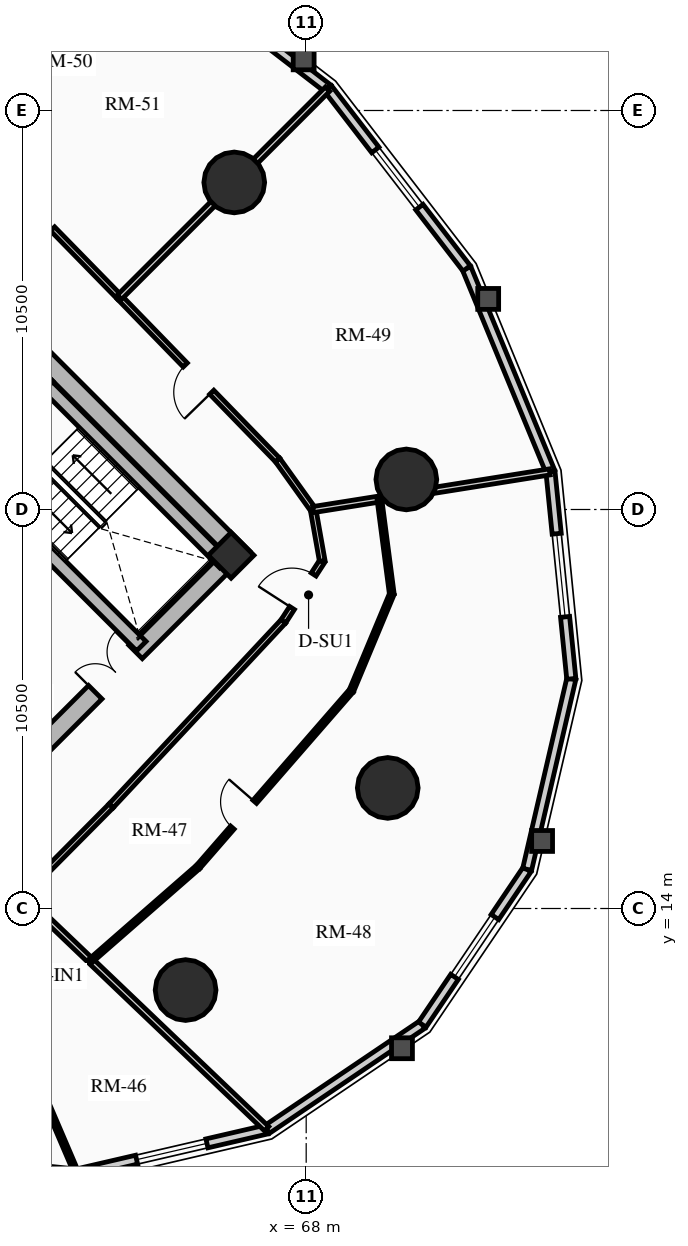
"""IFC4 building model, lengths in metres.
Left out: names, types, materials, properties, quantities, classifications, styles, units other than length and angle.
Written with IfcOpenShell. Run it as: python <this file> out.ifc"""

import sys

from ifc_helpers import new_model, si_unit, direction, frame, frame_2d, origin, origin_2d, place, context, subcontext, project, spatial, rectangle, circle, extrude, source, transform, mapped, element, fill, save


model = new_model("IFC4")
c1 = context("Model", 3, precision=1e-05, world=origin(), true_north=direction((0.0, 1.0)))
c2 = subcontext(c1, "Body", "Model", "MODEL_VIEW")
j1 = project(units=[si_unit("LENGTHUNIT", "METRE"), si_unit("PLANEANGLEUNIT", "RADIAN")], contexts=[c1])
p1 = place(None, origin())
s1 = spatial("IfcSite", under=j1, at=p1, CompositionType="ELEMENT")
p2 = place(p1, origin())
s2 = spatial("IfcBuilding", under=s1, at=p2, CompositionType="ELEMENT")
p3 = place(p2, frame((0.0, 0.0, 54.01)))
s3 = spatial("IfcBuildingStorey", under=s2, at=p3, CompositionType="ELEMENT", Elevation=54.01)
p4 = place(p3, frame((66.339, 23.227, 0.0), z_axis=(0.0, 0.0, 1.0), x_axis=(-0.707106781187, 0.707106781187, 0.0)))
e1 = element("IfcWall", 1, at=p4, inside=s3, PredefinedType="SHEAR", context=c2, shape_type="SweptSolid", body=[
    extrude(rectangle(XDim=14.3, YDim=0.5, at=frame_2d((7.15, 0.0))), origin(), (0.0, 0.0, 1.0), 2.91),
])
p5 = place(p3, frame((58.596, 15.838, 0.0), z_axis=(0.0, 0.0, 1.0), x_axis=(0.707106781187, 0.707106781187, 0.0)))
e2 = element("IfcWall", 2, at=p5, inside=s3, PredefinedType="SHEAR", context=c2, shape_type="SweptSolid", body=[
    extrude(rectangle(XDim=10.7, YDim=0.5, at=frame_2d((5.35, 0.0))), origin(), (0.0, 0.0, 1.0), 2.91),
])
m1 = source(origin(), c2, "Body", "SweptSolid", [
    extrude(rectangle(XDim=1.5, YDim=2.02, at=frame_2d((0.75, 1.01))), frame((0.0, 0.26, 0.0), z_axis=(0.0, -1.0, 0.0), x_axis=(1.0, 0.0, 0.0)), (0.0, 0.0, 1.0), 0.52),
])
p6 = place(p5, frame((5.45, 0.0, 0.0)))
e3 = element("IfcOpeningElement", 3, at=p6, cuts=e2, PredefinedType="OPENING", context=c2, shape_type="MappedRepresentation", body=[
    mapped(m1, transform((0.0, 0.0, 0.0), x_axis=(1.0, 0.0, 0.0), y_axis=(0.0, 1.0, 0.0), z_axis=(0.0, 0.0, 1.0), scale=1.0)),
])
p7 = place(p3, frame((63.662, 20.904, 0.0), z_axis=(0.0, 0.0, 1.0), x_axis=(-0.707106781187, 0.707106781187, 0.0)))
e4 = element("IfcWall", 4, at=p7, inside=s3, PredefinedType="SHEAR", context=c2, shape_type="SweptSolid", body=[
    extrude(rectangle(XDim=13.8, YDim=0.35, at=frame_2d((6.9, 0.0))), origin(), (0.0, 0.0, 1.0), 2.91),
])
m2 = source(origin(), c2, "Body", "SweptSolid", [
    extrude(rectangle(XDim=1.1, YDim=2.015, at=frame_2d((0.55, 1.007))), frame((0.0, 0.185, 0.0), z_axis=(0.0, -1.0, 0.0), x_axis=(1.0, 0.0, 0.0)), (0.0, 0.0, 1.0), 0.37),
])
p8 = place(p7, frame((10.025, 0.0, 0.0)))
e5 = element("IfcOpeningElement", 5, at=p8, cuts=e4, PredefinedType="OPENING", context=c2, shape_type="MappedRepresentation", body=[
    mapped(m2, transform((0.0, 0.0, 0.0), x_axis=(1.0, 0.0, 0.0), y_axis=(0.0, 1.0, 0.0), z_axis=(0.0, 0.0, 1.0), scale=1.0)),
])
p9 = place(p7, frame((12.025, 0.0, 0.0)))
e6 = element("IfcOpeningElement", 6, at=p9, cuts=e4, PredefinedType="OPENING", context=c2, shape_type="MappedRepresentation", body=[
    mapped(m2, transform((0.0, 0.0, 0.0), x_axis=(1.0, 0.0, 0.0), y_axis=(0.0, 1.0, 0.0), z_axis=(0.0, 0.0, 1.0), scale=1.0)),
])
m3 = source(origin(), c2, "Body", "SweptSolid", [
    extrude(rectangle(XDim=1.15, YDim=2.02, at=frame_2d((0.575, 1.01))), frame((0.0, 0.185, 0.0), z_axis=(0.0, -1.0, 0.0), x_axis=(1.0, 0.0, 0.0)), (0.0, 0.0, 1.0), 0.37),
])
p10 = place(p7, frame((5.33, 0.0, 0.0)))
e7 = element("IfcOpeningElement", 7, at=p10, cuts=e4, PredefinedType="OPENING", context=c2, shape_type="MappedRepresentation", body=[
    mapped(m3, transform((0.0, 0.0, 0.0), x_axis=(1.0, 0.0, 0.0), y_axis=(0.0, 1.0, 0.0), z_axis=(0.0, 0.0, 1.0), scale=1.0)),
])
p11 = place(p3, frame((65.847, 23.089, 0.0), z_axis=(0.0, 0.0, 1.0), x_axis=(-0.707106781187, 0.707106781187, 0.0)))
e8 = element("IfcWall", 8, at=p11, inside=s3, PredefinedType="SHEAR", context=c2, shape_type="SweptSolid", body=[
    extrude(rectangle(XDim=6.745, YDim=0.35, at=frame_2d((3.373, 0.0))), origin(), (0.0, 0.0, 1.0), 2.91),
])
p12 = place(p3, frame((58.893, 25.674, 0.0), z_axis=(0.0, 0.0, 1.0), x_axis=(0.707106781187, 0.707106781187, 0.0)))
e9 = element("IfcWall", 9, at=p12, inside=s3, PredefinedType="SHEAR", context=c2, shape_type="SweptSolid", body=[
    extrude(rectangle(XDim=3.285, YDim=0.35, at=frame_2d((1.643, 0.0))), origin(), (0.0, 0.0, 1.0), 2.91),
])
p13 = place(p3, frame((66.024, 23.294, 0.0), z_axis=(0.0, 0.0, 1.0), x_axis=(0.707106781187, 0.707106781187, 0.0)))
e10 = element("IfcColumn", 10, at=p13, inside=s3, PredefinedType="COLUMN", context=c2, shape_type="SweptSolid", body=[
    extrude(rectangle(XDim=0.85, YDim=0.85, at=origin_2d()), origin(), (0.0, 0.0, 1.0), 2.91),
])
for number, where, z_axis, x_axis in (
    (11, (66.107, 33.107, 0.0), (0.0, 0.0, 1.0), (1.0, 0.0, 0.0)),
    (12, (64.827, 11.854, 0.0), (0.0, 0.0, 1.0), (1.0, 0.0, 0.0)),
    (13, (70.146, 17.173, 0.0), (0.0, 0.0, 1.0), (1.0, 0.0, 0.0)),
    (14, (70.635, 25.291, 0.0), (0.0, 0.0, 1.0), (1.0, 0.0, 0.0)),
):
    element("IfcColumn", number, at=place(p3, frame(where, z_axis=z_axis, x_axis=x_axis)), inside=s3, PredefinedType="USERDEFINED", context=c2, shape_type="SweptSolid", body=[
        extrude(circle(Radius=0.8, at=origin_2d()), origin(), (0.0, 0.0, 1.0), 2.91),
    ])
p14 = place(p3, frame((63.844, 39.222, 0.0), z_axis=(0.0, 0.0, 1.0), x_axis=(0.792014314407, -0.610502519057, 0.0)))
e15 = element("IfcWall", 15, at=p14, inside=s3, PredefinedType="SOLIDWALL", context=c2, shape_type="SweptSolid", body=[
    extrude(rectangle(XDim=5.973, YDim=0.24, at=frame_2d((2.987, 0.0))), origin(), (0.0, 0.0, 1.0), 2.073),
])
p15 = place(p3, frame((61.957, 7.024, 0.0), z_axis=(0.0, 0.0, 1.0), x_axis=(-0.994970765694, 0.100165739718, 0.0)))
e16 = element("IfcWall", 16, at=p15, inside=s3, PredefinedType="SOLIDWALL", context=c2, shape_type="SweptSolid", body=[
    extrude(rectangle(XDim=5.477, YDim=0.24, at=frame_2d((2.738, 0.0))), origin(), (0.0, 0.0, 1.0), 2.073),
])
m4 = source(origin(), c2, "Body", "SweptSolid", [
    extrude(rectangle(XDim=1.9, YDim=1.35, at=frame_2d((0.95, 0.675))), frame((0.0, 0.13, 0.0), z_axis=(0.0, -1.0, 0.0), x_axis=(1.0, 0.0, 0.0)), (0.0, 0.0, 1.0), 0.26),
])
p16 = place(p15, frame((1.788, 0.0, 0.65)))
e17 = element("IfcOpeningElement", 17, at=p16, cuts=e16, PredefinedType="OPENING", context=c2, shape_type="MappedRepresentation", body=[
    mapped(m4, transform((0.0, 0.0, 0.0), x_axis=(1.0, 0.0, 0.0), y_axis=(0.0, 1.0, 0.0), z_axis=(0.0, 0.0, 1.0), scale=1.0)),
])
p17 = place(p3, frame((66.969, 8.186, 0.0), z_axis=(0.0, 0.0, 1.0), x_axis=(-0.974166016949, -0.225833060959, 0.0)))
e18 = element("IfcWall", 18, at=p17, inside=s3, PredefinedType="SOLIDWALL", context=c2, shape_type="SweptSolid", body=[
    extrude(rectangle(XDim=5.146, YDim=0.24, at=frame_2d((2.573, 0.0))), origin(), (0.0, 0.0, 1.0), 2.073),
])
p18 = place(p17, frame((1.623, 0.0, 0.65)))
e19 = element("IfcOpeningElement", 19, at=p18, cuts=e18, PredefinedType="OPENING", context=c2, shape_type="MappedRepresentation", body=[
    mapped(m4, transform((0.0, 0.0, 0.0), x_axis=(1.0, 0.0, 0.0), y_axis=(0.0, 1.0, 0.0), z_axis=(0.0, 0.0, 1.0), scale=1.0)),
])
p19 = place(p3, frame((71.055, 10.945, 0.0), z_axis=(0.0, 0.0, 1.0), x_axis=(-0.828736708604, -0.559638693991, 0.0)))
e20 = element("IfcWall", 20, at=p19, inside=s3, PredefinedType="SOLIDWALL", context=c2, shape_type="SweptSolid", body=[
    extrude(rectangle(XDim=4.93, YDim=0.24, at=frame_2d((2.465, 0.0))), origin(), (0.0, 0.0, 1.0), 2.073),
])
p20 = place(p3, frame((73.814, 15.031, 0.0), z_axis=(0.0, 0.0, 1.0), x_axis=(-0.559638693991, -0.828736708604, 0.0)))
e21 = element("IfcWall", 21, at=p20, inside=s3, PredefinedType="SOLIDWALL", context=c2, shape_type="SweptSolid", body=[
    extrude(rectangle(XDim=4.93, YDim=0.24, at=frame_2d((2.465, 0.0))), origin(), (0.0, 0.0, 1.0), 2.073),
])
p21 = place(p20, frame((1.515, 0.0, 0.65)))
e22 = element("IfcOpeningElement", 22, at=p21, cuts=e21, PredefinedType="OPENING", context=c2, shape_type="MappedRepresentation", body=[
    mapped(m4, transform((0.0, 0.0, 0.0), x_axis=(1.0, 0.0, 0.0), y_axis=(0.0, 1.0, 0.0), z_axis=(0.0, 0.0, 1.0), scale=1.0)),
])
p22 = place(p3, frame((74.976, 20.043, 0.0), z_axis=(0.0, 0.0, 1.0), x_axis=(-0.225833060959, -0.974166016949, 0.0)))
e23 = element("IfcWall", 23, at=p22, inside=s3, PredefinedType="SOLIDWALL", context=c2, shape_type="SweptSolid", body=[
    extrude(rectangle(XDim=5.146, YDim=0.24, at=frame_2d((2.573, 0.0))), origin(), (0.0, 0.0, 1.0), 2.073),
])
p23 = place(p3, frame((74.428, 25.493, 0.0), z_axis=(0.0, 0.0, 1.0), x_axis=(0.100165739718, -0.994970765694, 0.0)))
e24 = element("IfcWall", 24, at=p23, inside=s3, PredefinedType="SOLIDWALL", context=c2, shape_type="SweptSolid", body=[
    extrude(rectangle(XDim=5.477, YDim=0.24, at=frame_2d((2.738, 0.0))), origin(), (0.0, 0.0, 1.0), 2.073),
])
m5 = source(origin(), c2, "Body", "SweptSolid", [
    extrude(rectangle(XDim=2.2, YDim=1.35, at=frame_2d((1.1, 0.675))), frame((0.0, 0.13, 0.0), z_axis=(0.0, -1.0, 0.0), x_axis=(1.0, 0.0, 0.0)), (0.0, 0.0, 1.0), 0.26),
])
p24 = place(p23, frame((1.638, 0.0, 0.65)))
e25 = element("IfcOpeningElement", 25, at=p24, cuts=e24, PredefinedType="OPENING", context=c2, shape_type="MappedRepresentation", body=[
    mapped(m5, transform((0.0, 0.0, 0.0), x_axis=(1.0, 0.0, 0.0), y_axis=(0.0, 1.0, 0.0), z_axis=(0.0, 0.0, 1.0), scale=1.0)),
])
p25 = place(p3, frame((72.222, 30.844, 0.0), z_axis=(0.0, 0.0, 1.0), x_axis=(0.381027682565, -0.924563629567, 0.0)))
e26 = element("IfcWall", 26, at=p25, inside=s3, PredefinedType="SOLIDWALL", context=c2, shape_type="SweptSolid", body=[
    extrude(rectangle(XDim=5.789, YDim=0.24, at=frame_2d((2.894, 0.0))), origin(), (0.0, 0.0, 1.0), 2.073),
])
p26 = place(p3, frame((68.575, 35.575, 0.0), z_axis=(0.0, 0.0, 1.0), x_axis=(0.610502519057, -0.792014314407, 0.0)))
e27 = element("IfcWall", 27, at=p26, inside=s3, PredefinedType="SOLIDWALL", context=c2, shape_type="SweptSolid", body=[
    extrude(rectangle(XDim=5.973, YDim=0.24, at=frame_2d((2.987, 0.0))), origin(), (0.0, 0.0, 1.0), 2.073),
])
p27 = place(p26, frame((2.037, 0.0, 0.65)))
e28 = element("IfcOpeningElement", 28, at=p27, cuts=e27, PredefinedType="OPENING", context=c2, shape_type="MappedRepresentation", body=[
    mapped(m4, transform((0.0, 0.0, 0.0), x_axis=(1.0, 0.0, 0.0), y_axis=(0.0, 1.0, 0.0), z_axis=(0.0, 0.0, 1.0), scale=1.0)),
])
p28 = place(p3, frame((63.086, 30.086, 0.0), z_axis=(0.0, 0.0, 1.0), x_axis=(-0.699032802832, 0.715089603172, 0.0)))
e29 = element("IfcWall", 29, at=p28, inside=s3, PredefinedType="PARTITIONING", context=c2, shape_type="SweptSolid", body=[
    extrude(rectangle(XDim=6.082, YDim=0.15, at=frame_2d((3.041, 0.0))), origin(), (0.0, 0.0, 1.0), 2.159),
])
m6 = source(origin(), c2, "Body", "SweptSolid", [
    extrude(rectangle(XDim=1.05, YDim=2.015, at=frame_2d((0.525, 1.007))), frame((0.0, 0.085, 0.0), z_axis=(0.0, -1.0, 0.0), x_axis=(1.0, 0.0, 0.0)), (0.0, 0.0, 1.0), 0.17),
])
p29 = place(p28, frame((2.516, 0.0, 0.0)))
e30 = element("IfcOpeningElement", 30, at=p29, cuts=e29, PredefinedType="OPENING", context=c2, shape_type="MappedRepresentation", body=[
    mapped(m6, transform((0.0, 0.0, 0.0), x_axis=(1.0, 0.0, 0.0), y_axis=(0.0, 1.0, 0.0), z_axis=(0.0, 0.0, 1.0), scale=1.0)),
])
p30 = place(p3, frame((60.528, 14.344, 0.0), z_axis=(0.0, 0.0, 1.0), x_axis=(0.704381645997, 0.709821454158, 0.0)))
e31 = element("IfcWall", 31, at=p30, inside=s3, PredefinedType="PARTITIONING", context=c2, shape_type="SweptSolid", body=[
    extrude(rectangle(XDim=3.321, YDim=0.15, at=frame_2d((1.661, 0.0))), origin(), (0.0, 0.0, 1.0), 2.159),
])
p31 = place(p3, frame((62.867, 16.702, 0.0), z_axis=(0.0, 0.0, 1.0), x_axis=(0.682449206191, 0.73093302085, 0.0)))
e32 = element("IfcWall", 32, at=p31, inside=s3, PredefinedType="PARTITIONING", context=c2, shape_type="SweptSolid", body=[
    extrude(rectangle(XDim=6.642, YDim=0.15, at=frame_2d((3.321, 0.0))), origin(), (0.0, 0.0, 1.0), 2.159),
])
p32 = place(p3, frame((67.4, 21.556, 0.0), z_axis=(0.0, 0.0, 1.0), x_axis=(0.542247692187, 0.840218686009, 0.0)))
e33 = element("IfcWall", 33, at=p32, inside=s3, PredefinedType="PARTITIONING", context=c2, shape_type="SweptSolid", body=[
    extrude(rectangle(XDim=1.887, YDim=0.15, at=frame_2d((0.943, 0.0))), origin(), (0.0, 0.0, 1.0), 2.205),
])
p33 = place(p32, frame((0.419, 0.0, 0.0)))
e34 = element("IfcOpeningElement", 34, at=p33, cuts=e33, PredefinedType="OPENING", context=c2, shape_type="MappedRepresentation", body=[
    mapped(m6, transform((0.0, 0.0, 0.0), x_axis=(1.0, 0.0, 0.0), y_axis=(0.0, 1.0, 0.0), z_axis=(0.0, 0.0, 1.0), scale=1.0)),
])
p34 = place(p3, frame((68.423, 23.142, 0.0), z_axis=(0.0, 0.0, 1.0), x_axis=(-0.174796562349, 0.984604571283, 0.0)))
e35 = element("IfcWall", 35, at=p34, inside=s3, PredefinedType="PARTITIONING", context=c2, shape_type="SweptSolid", body=[
    extrude(rectangle(XDim=1.377, YDim=0.15, at=frame_2d((0.688, 0.0))), origin(), (0.0, 0.0, 1.0), 2.159),
])
p35 = place(p3, frame((68.182, 24.498, 0.0), z_axis=(0.0, 0.0, 1.0), x_axis=(-0.582532339525, 0.812807525437, 0.0)))
e36 = element("IfcWall", 36, at=p35, inside=s3, PredefinedType="PARTITIONING", context=c2, shape_type="SweptSolid", body=[
    extrude(rectangle(XDim=1.605, YDim=0.15, at=frame_2d((0.803, 0.0))), origin(), (0.0, 0.0, 1.0), 2.205),
])
p36 = place(p3, frame((67.247, 25.802, 0.0), z_axis=(0.0, 0.0, 1.0), x_axis=(-0.696771261687, 0.71729339108, 0.0)))
e37 = element("IfcWall", 37, at=p36, inside=s3, PredefinedType="PARTITIONING", context=c2, shape_type="SweptSolid", body=[
    extrude(rectangle(XDim=5.972, YDim=0.15, at=frame_2d((2.986, 0.0))), origin(), (0.0, 0.0, 1.0), 2.635),
])
m7 = source(origin(), c2, "Body", "SweptSolid", [
    extrude(rectangle(XDim=1.0, YDim=2.015, at=frame_2d((0.5, 1.007))), frame((0.0, 0.085, 0.0), z_axis=(0.0, -1.0, 0.0), x_axis=(1.0, 0.0, 0.0)), (0.0, 0.0, 1.0), 0.17),
])
p37 = place(p36, frame((2.486, 0.0, 0.0)))
e38 = element("IfcOpeningElement", 38, at=p37, cuts=e37, PredefinedType="OPENING", context=c2, shape_type="MappedRepresentation", body=[
    mapped(m7, transform((0.0, 0.0, 0.0), x_axis=(1.0, 0.0, 0.0), y_axis=(0.0, 1.0, 0.0), z_axis=(0.0, 0.0, 1.0), scale=1.0)),
])
p38 = place(p3, frame((63.086, 30.086, 0.0), z_axis=(0.0, 0.0, 1.0), x_axis=(0.707106781187, 0.707106781187, 0.0)))
e39 = element("IfcWall", 39, at=p38, inside=s3, PredefinedType="PARTITIONING", context=c2, shape_type="SweptSolid", body=[
    extrude(rectangle(XDim=7.743, YDim=0.16, at=frame_2d((3.872, 0.0))), origin(), (0.0, 0.0, 1.0), 2.073),
])
p39 = place(p3, frame((60.528, 14.344, 0.0), z_axis=(0.0, 0.0, 1.0), x_axis=(0.723320016743, -0.690512963947, 0.0)))
e40 = element("IfcWall", 40, at=p39, inside=s3, PredefinedType="PARTITIONING", context=c2, shape_type="SweptSolid", body=[
    extrude(rectangle(XDim=8.893, YDim=0.16, at=frame_2d((4.446, 0.0))), origin(), (0.0, 0.0, 1.0), 2.073),
])
p40 = place(p3, frame((68.182, 24.498, 0.0), z_axis=(0.0, 0.0, 1.0), x_axis=(0.987550107246, 0.157304754152, 0.0)))
e41 = element("IfcWall", 41, at=p40, inside=s3, PredefinedType="PARTITIONING", context=c2, shape_type="SweptSolid", body=[
    extrude(rectangle(XDim=6.304, YDim=0.16, at=frame_2d((3.152, 0.0))), origin(), (0.0, 0.0, 1.0), 2.073),
])
p41 = place(p3, frame((58.975, 13.996, 0.0), z_axis=(0.0, 0.0, 1.0), x_axis=(0.393755664375, -0.919215141723, 0.0)))
e42 = element("IfcWall", 42, at=p41, inside=s3, PredefinedType="PARTITIONING", context=c2, shape_type="SweptSolid", body=[
    extrude(rectangle(XDim=7.563, YDim=0.125, at=frame_2d((3.782, 0.0))), origin(), (0.0, 0.0, 1.0), 2.073),
])
m8 = source(origin(), c2, "Body", "SweptSolid", [
    extrude(rectangle(XDim=0.9, YDim=2.005, at=frame_2d((0.45, 1.002))), frame((0.0, 0.073, 0.0), z_axis=(0.0, -1.0, 0.0), x_axis=(1.0, 0.0, 0.0)), (0.0, 0.0, 1.0), 0.145),
])
p42 = place(p41, frame((1.8, 0.0, 0.0)))
e43 = element("IfcOpeningElement", 43, at=p42, cuts=e42, PredefinedType="OPENING", context=c2, shape_type="MappedRepresentation", body=[
    mapped(m8, transform((0.0, 0.0, 0.0), x_axis=(1.0, 0.0, 0.0), y_axis=(0.0, 1.0, 0.0), z_axis=(0.0, 0.0, 1.0), scale=1.0)),
])
p43 = place(p3, frame((62.329, 12.625, 0.0), z_axis=(0.0, 0.0, 1.0), x_axis=(0.753237140985, 0.657749047465, 0.0)))
e44 = element("IfcWall", 44, at=p43, inside=s3, PredefinedType="PARTITIONING", context=c2, shape_type="SweptSolid", body=[
    extrude(rectangle(XDim=3.753, YDim=0.125, at=frame_2d((1.877, 0.0))), origin(), (0.0, 0.0, 1.0), 2.159),
])
p44 = place(p3, frame((65.156, 15.094, 0.0), z_axis=(0.0, 0.0, 1.0), x_axis=(0.656356662483, 0.754450748302, 0.0)))
e45 = element("IfcWall", 45, at=p44, inside=s3, PredefinedType="PARTITIONING", context=c2, shape_type="SweptSolid", body=[
    extrude(rectangle(XDim=6.147, YDim=0.125, at=frame_2d((3.074, 0.0))), origin(), (0.0, 0.0, 1.0), 2.159),
])
p45 = place(p44, frame((1.372, 0.0, 0.0)))
e46 = element("IfcOpeningElement", 46, at=p45, cuts=e45, PredefinedType="OPENING", context=c2, shape_type="MappedRepresentation", body=[
    mapped(m8, transform((0.0, 0.0, 0.0), x_axis=(1.0, 0.0, 0.0), y_axis=(0.0, 1.0, 0.0), z_axis=(0.0, 0.0, 1.0), scale=1.0)),
])
p46 = place(p3, frame((69.191, 19.732, 0.0), z_axis=(0.0, 0.0, 1.0), x_axis=(0.385156247749, 0.922851377427, 0.0)))
e47 = element("IfcWall", 47, at=p46, inside=s3, PredefinedType="PARTITIONING", context=c2, shape_type="SweptSolid", body=[
    extrude(rectangle(XDim=2.756, YDim=0.125, at=frame_2d((1.378, 0.0))), origin(), (0.0, 0.0, 1.0), 2.205),
])
p47 = place(p3, frame((70.252, 22.275, 0.0), z_axis=(0.0, 0.0, 1.0), x_axis=(-0.129645482902, 0.991560411051, 0.0)))
e48 = element("IfcWall", 48, at=p47, inside=s3, PredefinedType="PARTITIONING", context=c2, shape_type="SweptSolid", body=[
    extrude(rectangle(XDim=2.521, YDim=0.125, at=frame_2d((1.261, 0.0))), origin(), (0.0, 0.0, 1.0), 2.635),
])
m9 = source(origin(), c2, "Body", "SweptSolid", [
    extrude(rectangle(XDim=1.9, YDim=1.35, at=frame_2d((0.95, 0.675))), frame((0.0, 0.03, 0.0), z_axis=(0.0, -1.0, 0.0), x_axis=(1.0, 0.0, 0.0)), (0.0, 0.0, 1.0), 0.06),
])
p48 = place(p18, origin())
e49 = element("IfcWindow", 49, at=p48, inside=s3, PartitioningType="DOUBLE_PANEL_VERTICAL", PredefinedType="WINDOW", context=c2, shape_type="MappedRepresentation", body=[
    mapped(m9, transform((0.0, 0.0, 0.0), x_axis=(1.0, 0.0, 0.0), y_axis=(0.0, 1.0, 0.0), z_axis=(0.0, 0.0, 1.0), scale=1.0)),
])
fill(e19, e49)
p49 = place(p21, origin())
e50 = element("IfcWindow", 50, at=p49, inside=s3, PartitioningType="DOUBLE_PANEL_VERTICAL", PredefinedType="WINDOW", context=c2, shape_type="MappedRepresentation", body=[
    mapped(m9, transform((0.0, 0.0, 0.0), x_axis=(1.0, 0.0, 0.0), y_axis=(0.0, 1.0, 0.0), z_axis=(0.0, 0.0, 1.0), scale=1.0)),
])
fill(e22, e50)
m10 = source(origin(), c2, "Body", "SweptSolid", [
    extrude(rectangle(XDim=2.2, YDim=1.35, at=frame_2d((1.1, 0.675))), frame((0.0, 0.03, 0.0), z_axis=(0.0, -1.0, 0.0), x_axis=(1.0, 0.0, 0.0)), (0.0, 0.0, 1.0), 0.06),
])
p50 = place(p24, origin())
e51 = element("IfcWindow", 51, at=p50, inside=s3, PartitioningType="DOUBLE_PANEL_VERTICAL", PredefinedType="WINDOW", context=c2, shape_type="MappedRepresentation", body=[
    mapped(m10, transform((0.0, 0.0, 0.0), x_axis=(1.0, 0.0, 0.0), y_axis=(0.0, 1.0, 0.0), z_axis=(0.0, 0.0, 1.0), scale=1.0)),
])
fill(e25, e51)
p51 = place(p27, origin())
e52 = element("IfcWindow", 52, at=p51, inside=s3, PartitioningType="DOUBLE_PANEL_VERTICAL", PredefinedType="WINDOW", context=c2, shape_type="MappedRepresentation", body=[
    mapped(m9, transform((0.0, 0.0, 0.0), x_axis=(1.0, 0.0, 0.0), y_axis=(0.0, 1.0, 0.0), z_axis=(0.0, 0.0, 1.0), scale=1.0)),
])
fill(e28, e52)
m11 = source(origin(), c2, "Body", "SweptSolid", [
    extrude(rectangle(XDim=1.5, YDim=2.02, at=frame_2d((0.75, 1.01))), frame((0.0, 0.025, 0.0), z_axis=(0.0, -1.0, 0.0), x_axis=(1.0, 0.0, 0.0)), (0.0, 0.0, 1.0), 0.05),
])
p52 = place(p6, origin())
e53 = element("IfcDoor", 53, at=p52, inside=s3, OperationType="DOUBLE_DOOR_SINGLE_SWING", PredefinedType="DOOR", context=c2, shape_type="MappedRepresentation", body=[
    mapped(m11, transform((0.0, 0.0, 0.0), x_axis=(1.0, 0.0, 0.0), y_axis=(0.0, 1.0, 0.0), z_axis=(0.0, 0.0, 1.0), scale=1.0)),
])
fill(e3, e53)
m12 = source(origin(), c2, "Body", "SweptSolid", [
    extrude(rectangle(XDim=1.05, YDim=2.015, at=frame_2d((0.525, 1.007))), frame((0.0, 0.025, 0.0), z_axis=(0.0, -1.0, 0.0), x_axis=(1.0, 0.0, 0.0)), (0.0, 0.0, 1.0), 0.05),
])
p53 = place(p33, origin())
e54 = element("IfcDoor", 54, at=p53, inside=s3, OperationType="SINGLE_SWING_LEFT", PredefinedType="DOOR", context=c2, shape_type="MappedRepresentation", body=[
    mapped(m12, transform((0.0, 0.0, 0.0), x_axis=(1.0, 0.0, 0.0), y_axis=(0.0, 1.0, 0.0), z_axis=(0.0, 0.0, 1.0), scale=1.0)),
])
fill(e34, e54)
m13 = source(origin(), c2, "Body", "SweptSolid", [
    extrude(rectangle(XDim=0.9, YDim=2.005, at=frame_2d((0.45, 1.002))), frame((0.0, 0.025, 0.0), z_axis=(0.0, -1.0, 0.0), x_axis=(1.0, 0.0, 0.0)), (0.0, 0.0, 1.0), 0.05),
])
p54 = place(p45, origin())
e55 = element("IfcDoor", 55, at=p54, inside=s3, OperationType="SINGLE_SWING_RIGHT", PredefinedType="DOOR", context=c2, shape_type="MappedRepresentation", body=[
    mapped(m13, transform((0.0, 0.0, 0.0), x_axis=(1.0, 0.0, 0.0), y_axis=(0.0, 1.0, 0.0), z_axis=(0.0, 0.0, 1.0), scale=1.0)),
])
fill(e46, e55)
m14 = source(origin(), c2, "Body", "SweptSolid", [
    extrude(rectangle(XDim=1.0, YDim=2.015, at=frame_2d((0.5, 1.007))), frame((0.0, 0.025, 0.0), z_axis=(0.0, -1.0, 0.0), x_axis=(1.0, 0.0, 0.0)), (0.0, 0.0, 1.0), 0.05),
])
p55 = place(p37, origin())
e56 = element("IfcDoor", 56, at=p55, inside=s3, OperationType="SINGLE_SWING_LEFT", PredefinedType="DOOR", context=c2, shape_type="MappedRepresentation", body=[
    mapped(m14, transform((0.0, 0.0, 0.0), x_axis=(1.0, 0.0, 0.0), y_axis=(0.0, 1.0, 0.0), z_axis=(0.0, 0.0, 1.0), scale=1.0)),
])
fill(e38, e56)
p56 = place(p29, origin())
e57 = element("IfcDoor", 57, at=p56, inside=s3, OperationType="SINGLE_SWING_RIGHT", PredefinedType="DOOR", context=c2, shape_type="MappedRepresentation", body=[
    mapped(m12, transform((0.0, 0.0, 0.0), x_axis=(1.0, 0.0, 0.0), y_axis=(0.0, 1.0, 0.0), z_axis=(0.0, 0.0, 1.0), scale=1.0)),
])
fill(e30, e57)
save(model, sys.argv[1])
